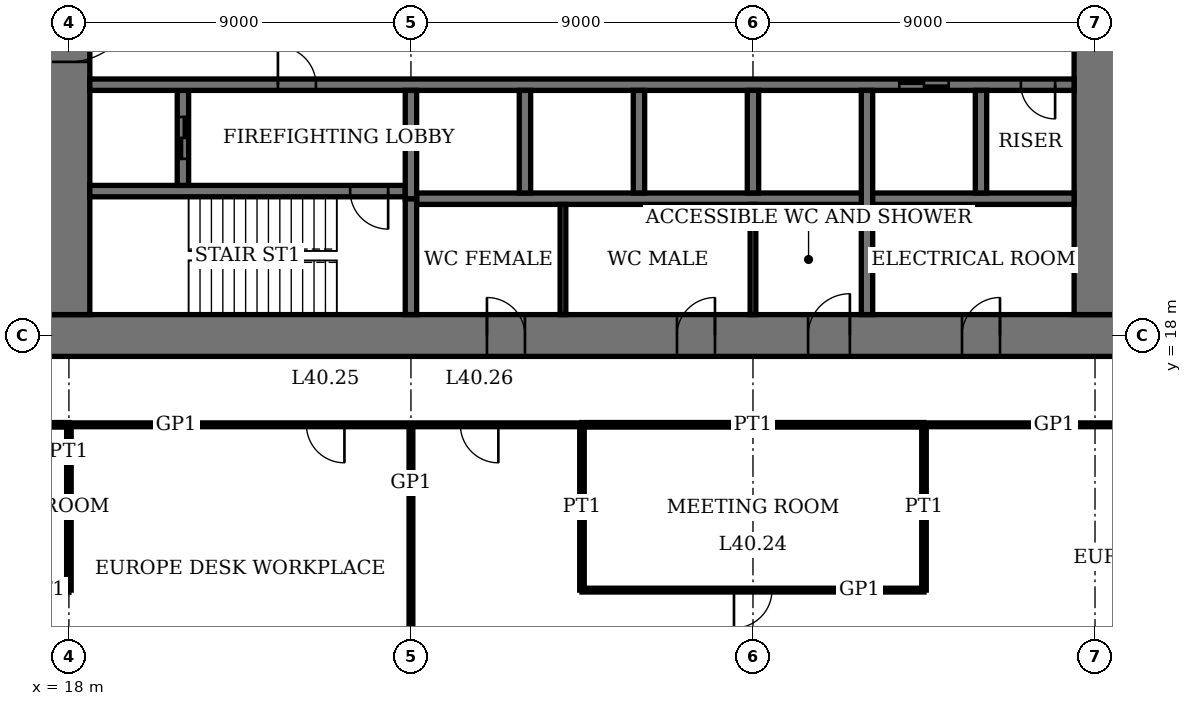
"""IFC4 building model, lengths in metres.
Left out: names, types, materials, properties, quantities, classifications, styles, units other than length and angle.
Written with IfcOpenShell. Run it as: python <this file> out.ifc"""

import sys

from ifc_helpers import new_model, si_unit, direction, frame, frame_2d, origin, place, context, subcontext, project, spatial, rectangle, extrude, element, fill, save


model = new_model("IFC4")
c1 = context("Model", 3, precision=1e-05, world=origin(), true_north=direction((0.0, 1.0)))
c2 = subcontext(c1, "Body", "Model", "MODEL_VIEW")
j1 = project(units=[si_unit("LENGTHUNIT", "METRE"), si_unit("PLANEANGLEUNIT", "RADIAN")], contexts=[c1])
p1 = place(None, origin())
s1 = spatial("IfcSite", under=j1, at=p1, CompositionType="ELEMENT")
p2 = place(p1, origin())
s2 = spatial("IfcBuilding", under=s1, at=p2, CompositionType="ELEMENT")
p3 = place(p2, frame((0.0, 0.0, 166.2)))
s3 = spatial("IfcBuildingStorey", under=s2, at=p3, CompositionType="ELEMENT", Elevation=166.2)
p4 = place(p3, frame((17.45, 18.0, 0.0), z_axis=(0.0, 0.0, 1.0), x_axis=(1.0, 0.0, 0.0)))
e1 = element("IfcWall", 1, at=p4, inside=s3, PredefinedType="SHEAR", context=c2, shape_type="SweptSolid", body=[
    extrude(rectangle(XDim=28.1, YDim=1.1, at=frame_2d((14.05, 0.0))), origin(), (0.0, 0.0, 1.0), 4.0),
])
p5 = place(p4, frame((11.55, 0.0, 0.0)))
e2 = element("IfcOpeningElement", 2, at=p5, cuts=e1, PredefinedType="OPENING", context=c2, shape_type="SweptSolid", body=[
    extrude(rectangle(XDim=1.0, YDim=2.4, at=frame_2d((0.5, 1.2))), frame((0.0, 0.56, 0.0), z_axis=(0.0, -1.0, 0.0), x_axis=(1.0, 0.0, 0.0)), (0.0, 0.0, 1.0), 1.12),
])
p6 = place(p4, frame((16.55, 0.0, 0.0)))
e3 = element("IfcOpeningElement", 3, at=p6, cuts=e1, PredefinedType="OPENING", context=c2, shape_type="SweptSolid", body=[
    extrude(rectangle(XDim=1.0, YDim=2.4, at=frame_2d((0.5, 1.2))), frame((0.0, 0.56, 0.0), z_axis=(0.0, -1.0, 0.0), x_axis=(1.0, 0.0, 0.0)), (0.0, 0.0, 1.0), 1.12),
])
p7 = place(p4, frame((20.0, 0.0, 0.0)))
e4 = element("IfcOpeningElement", 4, at=p7, cuts=e1, PredefinedType="OPENING", context=c2, shape_type="SweptSolid", body=[
    extrude(rectangle(XDim=1.1, YDim=2.4, at=frame_2d((0.55, 1.2))), frame((0.0, 0.56, 0.0), z_axis=(0.0, -1.0, 0.0), x_axis=(1.0, 0.0, 0.0)), (0.0, 0.0, 1.0), 1.12),
])
p8 = place(p4, frame((24.05, 0.0, 0.0)))
e5 = element("IfcOpeningElement", 5, at=p8, cuts=e1, PredefinedType="OPENING", context=c2, shape_type="SweptSolid", body=[
    extrude(rectangle(XDim=1.0, YDim=2.4, at=frame_2d((0.5, 1.2))), frame((0.0, 0.56, 0.0), z_axis=(0.0, -1.0, 0.0), x_axis=(1.0, 0.0, 0.0)), (0.0, 0.0, 1.0), 1.12),
])
p9 = place(p3, frame((18.0, 35.45, 0.0), z_axis=(0.0, 0.0, 1.0), x_axis=(0.0, -1.0, 0.0)))
e6 = element("IfcWall", 6, at=p9, inside=s3, PredefinedType="SHEAR", context=c2, shape_type="SweptSolid", body=[
    extrude(rectangle(XDim=16.9, YDim=1.1, at=frame_2d((8.45, 0.0))), origin(), (0.0, 0.0, 1.0), 4.0),
])
p10 = place(p9, frame((8.45, 0.0, 0.0)))
e7 = element("IfcOpeningElement", 7, at=p10, cuts=e6, PredefinedType="OPENING", context=c2, shape_type="SweptSolid", body=[
    extrude(rectangle(XDim=1.8, YDim=2.4, at=frame_2d((0.9, 1.2))), frame((0.0, 0.56, 0.0), z_axis=(0.0, -1.0, 0.0), x_axis=(1.0, 0.0, 0.0)), (0.0, 0.0, 1.0), 1.12),
])
p11 = place(p3, frame((45.0, 18.55, 0.0), z_axis=(0.0, 0.0, 1.0), x_axis=(0.0, 1.0, 0.0)))
e8 = element("IfcWall", 8, at=p11, inside=s3, PredefinedType="SHEAR", context=c2, shape_type="SweptSolid", body=[
    extrude(rectangle(XDim=16.9, YDim=1.1, at=frame_2d((8.45, 0.0))), origin(), (0.0, 0.0, 1.0), 4.0),
])
p12 = place(p11, frame((8.45, 0.0, 0.0)))
e9 = element("IfcOpeningElement", 9, at=p12, cuts=e8, PredefinedType="OPENING", context=c2, shape_type="SweptSolid", body=[
    extrude(rectangle(XDim=1.8, YDim=2.4, at=frame_2d((0.9, 1.2))), frame((0.0, 0.56, 0.0), z_axis=(0.0, -1.0, 0.0), x_axis=(1.0, 0.0, 0.0)), (0.0, 0.0, 1.0), 1.12),
])
p13 = place(p3, frame((18.55, 21.8, 0.0), z_axis=(0.0, 0.0, 1.0), x_axis=(1.0, 0.0, 0.0)))
e10 = element("IfcWall", 10, at=p13, inside=s3, PredefinedType="SHEAR", context=c2, shape_type="SweptSolid", body=[
    extrude(rectangle(XDim=8.3, YDim=0.3, at=frame_2d((4.15, 0.0))), origin(), (0.0, 0.0, 1.0), 4.0),
])
p14 = place(p13, frame((6.85, 0.0, 0.0)))
e11 = element("IfcOpeningElement", 11, at=p14, cuts=e10, PredefinedType="OPENING", context=c2, shape_type="SweptSolid", body=[
    extrude(rectangle(XDim=1.0, YDim=2.4, at=frame_2d((0.5, 1.2))), frame((0.0, 0.16, 0.0), z_axis=(0.0, -1.0, 0.0), x_axis=(1.0, 0.0, 0.0)), (0.0, 0.0, 1.0), 0.32),
])
p15 = place(p3, frame((27.0, 18.55, 0.0), z_axis=(0.0, 0.0, 1.0), x_axis=(0.0, 1.0, 0.0)))
e12 = element("IfcWall", 12, at=p15, inside=s3, PredefinedType="SHEAR", context=c2, shape_type="SweptSolid", body=[
    extrude(rectangle(XDim=3.05, YDim=0.3, at=frame_2d((1.525, 0.0))), origin(), (0.0, 0.0, 1.0), 4.0),
])
p16 = place(p3, frame((21.0, 21.95, 0.0), z_axis=(0.0, 0.0, 1.0), x_axis=(0.0, 1.0, 0.0)))
e13 = element("IfcWall", 13, at=p16, inside=s3, PredefinedType="SHEAR", context=c2, shape_type="SweptSolid", body=[
    extrude(rectangle(XDim=2.5, YDim=0.3, at=frame_2d((1.25, 0.0))), origin(), (0.0, 0.0, 1.0), 4.0),
])
p17 = place(p16, frame((0.7, 0.0, 0.0)))
e14 = element("IfcOpeningElement", 14, at=p17, cuts=e13, PredefinedType="OPENING", context=c2, shape_type="SweptSolid", body=[
    extrude(rectangle(XDim=1.1, YDim=2.4, at=frame_2d((0.55, 1.2))), frame((0.0, 0.16, 0.0), z_axis=(0.0, -1.0, 0.0), x_axis=(1.0, 0.0, 0.0)), (0.0, 0.0, 1.0), 0.32),
])
p18 = place(p3, frame((18.55, 24.6, 0.0), z_axis=(0.0, 0.0, 1.0), x_axis=(1.0, 0.0, 0.0)))
e15 = element("IfcWall", 15, at=p18, inside=s3, PredefinedType="SHEAR", context=c2, shape_type="SweptSolid", body=[
    extrude(rectangle(XDim=25.9, YDim=0.3, at=frame_2d((12.95, 0.0))), origin(), (0.0, 0.0, 1.0), 4.0),
])
p19 = place(p18, frame((4.95, 0.0, 0.0)))
e16 = element("IfcOpeningElement", 16, at=p19, cuts=e15, PredefinedType="OPENING", context=c2, shape_type="SweptSolid", body=[
    extrude(rectangle(XDim=1.0, YDim=2.4, at=frame_2d((0.5, 1.2))), frame((0.0, 0.16, 0.0), z_axis=(0.0, -1.0, 0.0), x_axis=(1.0, 0.0, 0.0)), (0.0, 0.0, 1.0), 0.32),
])
p20 = place(p18, frame((24.5, 0.0, 0.0)))
e17 = element("IfcOpeningElement", 17, at=p20, cuts=e15, PredefinedType="OPENING", context=c2, shape_type="SweptSolid", body=[
    extrude(rectangle(XDim=0.9, YDim=2.1, at=frame_2d((0.45, 1.05))), frame((0.0, 0.16, 0.0), z_axis=(0.0, -1.0, 0.0), x_axis=(1.0, 0.0, 0.0)), (0.0, 0.0, 1.0), 0.32),
])
p21 = place(p18, frame((21.3, 0.0, 0.0)))
e18 = element("IfcOpeningElement", 18, at=p21, cuts=e15, PredefinedType="OPENING", context=c2, shape_type="SweptSolid", body=[
    extrude(rectangle(XDim=1.3, YDim=2.4, at=frame_2d((0.65, 1.2))), frame((0.0, 0.16, 0.0), z_axis=(0.0, -1.0, 0.0), x_axis=(1.0, 0.0, 0.0)), (0.0, 0.0, 1.0), 0.32),
])
p22 = place(p3, frame((27.15, 21.6, 0.0), z_axis=(0.0, 0.0, 1.0), x_axis=(1.0, 0.0, 0.0)))
e19 = element("IfcWall", 19, at=p22, inside=s3, PredefinedType="SHEAR", context=c2, shape_type="SweptSolid", body=[
    extrude(rectangle(XDim=17.3, YDim=0.3, at=frame_2d((8.65, 0.0))), origin(), (0.0, 0.0, 1.0), 4.0),
])
for number, where, z_axis, x_axis in (
    (20, (30.0, 21.75, 0.0), (0.0, 0.0, 1.0), (0.0, 1.0, 0.0)),
    (21, (33.0, 21.75, 0.0), (0.0, 0.0, 1.0), (0.0, 1.0, 0.0)),
    (22, (36.0, 21.75, 0.0), (0.0, 0.0, 1.0), (0.0, 1.0, 0.0)),
):
    element("IfcWall", number, at=place(p3, frame(where, z_axis=z_axis, x_axis=x_axis)), inside=s3, PredefinedType="SHEAR", context=c2, shape_type="SweptSolid", body=[
        extrude(rectangle(XDim=2.7, YDim=0.3, at=frame_2d((1.35, 0.0))), origin(), (0.0, 0.0, 1.0), 4.0),
    ])
p23 = place(p3, frame((39.0, 18.55, 0.0), z_axis=(0.0, 0.0, 1.0), x_axis=(0.0, 1.0, 0.0)))
e23 = element("IfcWall", 23, at=p23, inside=s3, PredefinedType="SHEAR", context=c2, shape_type="SweptSolid", body=[
    extrude(rectangle(XDim=5.9, YDim=0.3, at=frame_2d((2.95, 0.0))), origin(), (0.0, 0.0, 1.0), 4.0),
])
p24 = place(p3, frame((42.0, 21.75, 0.0), z_axis=(0.0, 0.0, 1.0), x_axis=(0.0, 1.0, 0.0)))
e24 = element("IfcWall", 24, at=p24, inside=s3, PredefinedType="SHEAR", context=c2, shape_type="SweptSolid", body=[
    extrude(rectangle(XDim=2.7, YDim=0.3, at=frame_2d((1.35, 0.0))), origin(), (0.0, 0.0, 1.0), 4.0),
])
p25 = place(p3, frame((27.0, 21.6, 0.0), z_axis=(0.0, 0.0, 1.0), x_axis=(0.0, 1.0, 0.0)))
e25 = element("IfcWall", 25, at=p25, inside=s3, PredefinedType="SHEAR", context=c2, shape_type="SweptSolid", body=[
    extrude(rectangle(XDim=2.85, YDim=0.3, at=frame_2d((1.425, 0.0))), origin(), (0.0, 0.0, 1.0), 4.0),
])
p26 = place(p3, frame((13.5, 11.3, 0.0), z_axis=(0.0, 0.0, 1.0), x_axis=(1.0, 0.0, 0.0)))
e26 = element("IfcWall", 26, at=p26, inside=s3, PredefinedType="PARTITIONING", context=c2, shape_type="SweptSolid", body=[
    extrude(rectangle(XDim=4.5, YDim=0.12, at=frame_2d((2.25, 0.0))), origin(), (0.0, 0.0, 1.0), 3.75),
])
p27 = place(p26, frame((1.75, 0.0, 0.0)))
e27 = element("IfcOpeningElement", 27, at=p27, cuts=e26, PredefinedType="OPENING", context=c2, shape_type="SweptSolid", body=[
    extrude(rectangle(XDim=1.0, YDim=2.4, at=frame_2d((0.5, 1.2))), frame((0.0, 0.07, 0.0), z_axis=(0.0, -1.0, 0.0), x_axis=(1.0, 0.0, 0.0)), (0.0, 0.0, 1.0), 0.14),
])
p28 = place(p3, frame((31.5, 11.3, 0.0), z_axis=(0.0, 0.0, 1.0), x_axis=(1.0, 0.0, 0.0)))
e28 = element("IfcWall", 28, at=p28, inside=s3, PredefinedType="PARTITIONING", context=c2, shape_type="SweptSolid", body=[
    extrude(rectangle(XDim=9.0, YDim=0.1, at=frame_2d((4.5, 0.0))), origin(), (0.0, 0.0, 1.0), 3.75),
])
p29 = place(p28, frame((4.0, 0.0, 0.0)))
e29 = element("IfcOpeningElement", 29, at=p29, cuts=e28, PredefinedType="OPENING", context=c2, shape_type="SweptSolid", body=[
    extrude(rectangle(XDim=1.0, YDim=2.4, at=frame_2d((0.5, 1.2))), frame((0.0, 0.06, 0.0), z_axis=(0.0, -1.0, 0.0), x_axis=(1.0, 0.0, 0.0)), (0.0, 0.0, 1.0), 0.12),
])
p30 = place(p3, frame((31.5, 15.65, 0.0), z_axis=(0.0, 0.0, 1.0), x_axis=(1.0, 0.0, 0.0)))
e30 = element("IfcWall", 30, at=p30, inside=s3, PredefinedType="PARTITIONING", context=c2, shape_type="SweptSolid", body=[
    extrude(rectangle(XDim=9.0, YDim=0.12, at=frame_2d((4.5, 0.0))), origin(), (0.0, 0.0, 1.0), 3.75),
])
p31 = place(p3, frame((13.5, 15.65, 0.0), z_axis=(0.0, 0.0, 1.0), x_axis=(1.0, 0.0, 0.0)))
e31 = element("IfcWall", 31, at=p31, inside=s3, PredefinedType="PARTITIONING", context=c2, shape_type="SweptSolid", body=[
    extrude(rectangle(XDim=4.5, YDim=0.12, at=frame_2d((2.25, 0.0))), origin(), (0.0, 0.0, 1.0), 3.75),
])
p32 = place(p3, frame((18.0, 15.65, 0.0), z_axis=(0.0, 0.0, 1.0), x_axis=(1.0, 0.0, 0.0)))
e32 = element("IfcWall", 32, at=p32, inside=s3, PredefinedType="PARTITIONING", context=c2, shape_type="SweptSolid", body=[
    extrude(rectangle(XDim=13.5, YDim=0.1, at=frame_2d((6.75, 0.0))), origin(), (0.0, 0.0, 1.0), 3.75),
])
p33 = place(p32, frame((6.25, 0.0, 0.0)))
e33 = element("IfcOpeningElement", 33, at=p33, cuts=e32, PredefinedType="OPENING", context=c2, shape_type="SweptSolid", body=[
    extrude(rectangle(XDim=1.0, YDim=2.4, at=frame_2d((0.5, 1.2))), frame((0.0, 0.06, 0.0), z_axis=(0.0, -1.0, 0.0), x_axis=(1.0, 0.0, 0.0)), (0.0, 0.0, 1.0), 0.12),
])
p34 = place(p32, frame((10.3, 0.0, 0.0)))
e34 = element("IfcOpeningElement", 34, at=p34, cuts=e32, PredefinedType="OPENING", context=c2, shape_type="SweptSolid", body=[
    extrude(rectangle(XDim=1.0, YDim=2.4, at=frame_2d((0.5, 1.2))), frame((0.0, 0.06, 0.0), z_axis=(0.0, -1.0, 0.0), x_axis=(1.0, 0.0, 0.0)), (0.0, 0.0, 1.0), 0.12),
])
p35 = place(p3, frame((40.5, 15.65, 0.0), z_axis=(0.0, 0.0, 1.0), x_axis=(1.0, 0.0, 0.0)))
e35 = element("IfcWall", 35, at=p35, inside=s3, PredefinedType="PARTITIONING", context=c2, shape_type="SweptSolid", body=[
    extrude(rectangle(XDim=6.85, YDim=0.1, at=frame_2d((3.425, 0.0))), origin(), (0.0, 0.0, 1.0), 3.75),
])
p36 = place(p3, frame((18.0, 11.3, 0.0), z_axis=(0.0, 0.0, 1.0), x_axis=(0.0, 1.0, 0.0)))
e36 = element("IfcWall", 36, at=p36, inside=s3, PredefinedType="PARTITIONING", context=c2, shape_type="SweptSolid", body=[
    extrude(rectangle(XDim=4.35, YDim=0.12, at=frame_2d((2.175, 0.0))), origin(), (0.0, 0.0, 1.0), 3.05),
])
p37 = place(p3, frame((27.0, 9.9, 0.0), z_axis=(0.0, 0.0, 1.0), x_axis=(0.0, 1.0, 0.0)))
e37 = element("IfcWall", 37, at=p37, inside=s3, PredefinedType="PARTITIONING", context=c2, shape_type="SweptSolid", body=[
    extrude(rectangle(XDim=5.75, YDim=0.1, at=frame_2d((2.875, 0.0))), origin(), (0.0, 0.0, 1.0), 3.05),
])
for number, where, z_axis, x_axis in (
    (38, (31.5, 11.3, 0.0), (0.0, 0.0, 1.0), (0.0, 1.0, 0.0)),
    (39, (40.5, 11.3, 0.0), (0.0, 0.0, 1.0), (0.0, 1.0, 0.0)),
):
    element("IfcWall", number, at=place(p3, frame(where, z_axis=z_axis, x_axis=x_axis)), inside=s3, PredefinedType="PARTITIONING", context=c2, shape_type="SweptSolid", body=[
        extrude(rectangle(XDim=4.35, YDim=0.12, at=frame_2d((2.175, 0.0))), origin(), (0.0, 0.0, 1.0), 3.75),
    ])
for number, where, z_axis, x_axis in (
    (40, (31.0, 18.55, 0.0), (0.0, 0.0, 1.0), (0.0, 1.0, 0.0)),
    (41, (36.0, 18.55, 0.0), (0.0, 0.0, 1.0), (0.0, 1.0, 0.0)),
):
    element("IfcWall", number, at=place(p3, frame(where, z_axis=z_axis, x_axis=x_axis)), inside=s3, PredefinedType="PARTITIONING", context=c2, shape_type="SweptSolid", body=[
        extrude(rectangle(XDim=2.9, YDim=0.15, at=frame_2d((1.45, 0.0))), origin(), (0.0, 0.0, 1.0), 3.75),
    ])
p38 = place(p10, origin())
e42 = element("IfcDoor", 42, at=p38, inside=s3, OperationType="DOUBLE_DOOR_DOUBLE_SWING", PredefinedType="DOOR", context=c2, shape_type="SweptSolid", body=[
    extrude(rectangle(XDim=1.8, YDim=2.4, at=frame_2d((0.9, 1.2))), frame((0.0, 0.03, 0.0), z_axis=(0.0, -1.0, 0.0), x_axis=(1.0, 0.0, 0.0)), (0.0, 0.0, 1.0), 0.06),
    extrude(rectangle(XDim=0.04, YDim=2.4, at=frame_2d((0.02, 1.2))), frame((0.0, 0.55, 0.0), z_axis=(0.0, -1.0, 0.0), x_axis=(1.0, 0.0, 0.0)), (0.0, 0.0, 1.0), 1.1),
    extrude(rectangle(XDim=0.04, YDim=2.4, at=frame_2d((1.78, 1.2))), frame((0.0, 0.55, 0.0), z_axis=(0.0, -1.0, 0.0), x_axis=(1.0, 0.0, 0.0)), (0.0, 0.0, 1.0), 1.1),
    extrude(rectangle(XDim=1.8, YDim=0.04, at=frame_2d((0.9, 2.38))), frame((0.0, 0.55, 0.0), z_axis=(0.0, -1.0, 0.0), x_axis=(1.0, 0.0, 0.0)), (0.0, 0.0, 1.0), 1.1),
])
fill(e7, e42)
p39 = place(p5, origin())
e43 = element("IfcDoor", 43, at=p39, inside=s3, OperationType="SINGLE_SWING_RIGHT", PredefinedType="DOOR", context=c2, shape_type="SweptSolid", body=[
    extrude(rectangle(XDim=1.0, YDim=2.4, at=frame_2d((0.5, 1.2))), frame((0.0, 0.025, 0.0), z_axis=(0.0, -1.0, 0.0), x_axis=(1.0, 0.0, 0.0)), (0.0, 0.0, 1.0), 0.05),
    extrude(rectangle(XDim=0.04, YDim=2.4, at=frame_2d((0.02, 1.2))), frame((0.0, 0.4, 0.0), z_axis=(0.0, -1.0, 0.0), x_axis=(1.0, 0.0, 0.0)), (0.0, 0.0, 1.0), 0.8),
    extrude(rectangle(XDim=0.04, YDim=2.4, at=frame_2d((0.98, 1.2))), frame((0.0, 0.4, 0.0), z_axis=(0.0, -1.0, 0.0), x_axis=(1.0, 0.0, 0.0)), (0.0, 0.0, 1.0), 0.8),
    extrude(rectangle(XDim=1.0, YDim=0.04, at=frame_2d((0.5, 2.38))), frame((0.0, 0.4, 0.0), z_axis=(0.0, -1.0, 0.0), x_axis=(1.0, 0.0, 0.0)), (0.0, 0.0, 1.0), 0.8),
])
fill(e2, e43)
p40 = place(p6, origin())
e44 = element("IfcDoor", 44, at=p40, inside=s3, OperationType="SINGLE_SWING_LEFT", PredefinedType="DOOR", context=c2, shape_type="SweptSolid", body=[
    extrude(rectangle(XDim=1.0, YDim=2.4, at=frame_2d((0.5, 1.2))), frame((0.0, 0.025, 0.0), z_axis=(0.0, -1.0, 0.0), x_axis=(1.0, 0.0, 0.0)), (0.0, 0.0, 1.0), 0.05),
    extrude(rectangle(XDim=0.04, YDim=2.4, at=frame_2d((0.02, 1.2))), frame((0.0, 0.4, 0.0), z_axis=(0.0, -1.0, 0.0), x_axis=(1.0, 0.0, 0.0)), (0.0, 0.0, 1.0), 0.8),
    extrude(rectangle(XDim=0.04, YDim=2.4, at=frame_2d((0.98, 1.2))), frame((0.0, 0.4, 0.0), z_axis=(0.0, -1.0, 0.0), x_axis=(1.0, 0.0, 0.0)), (0.0, 0.0, 1.0), 0.8),
    extrude(rectangle(XDim=1.0, YDim=0.04, at=frame_2d((0.5, 2.38))), frame((0.0, 0.4, 0.0), z_axis=(0.0, -1.0, 0.0), x_axis=(1.0, 0.0, 0.0)), (0.0, 0.0, 1.0), 0.8),
])
fill(e3, e44)
p41 = place(p7, origin())
e45 = element("IfcDoor", 45, at=p41, inside=s3, OperationType="SINGLE_SWING_LEFT", PredefinedType="DOOR", context=c2, shape_type="SweptSolid", body=[
    extrude(rectangle(XDim=1.1, YDim=2.4, at=frame_2d((0.55, 1.2))), frame((0.0, 0.025, 0.0), z_axis=(0.0, -1.0, 0.0), x_axis=(1.0, 0.0, 0.0)), (0.0, 0.0, 1.0), 0.05),
    extrude(rectangle(XDim=0.04, YDim=2.4, at=frame_2d((0.02, 1.2))), frame((0.0, 0.44, 0.0), z_axis=(0.0, -1.0, 0.0), x_axis=(1.0, 0.0, 0.0)), (0.0, 0.0, 1.0), 0.88),
    extrude(rectangle(XDim=0.04, YDim=2.4, at=frame_2d((1.08, 1.2))), frame((0.0, 0.44, 0.0), z_axis=(0.0, -1.0, 0.0), x_axis=(1.0, 0.0, 0.0)), (0.0, 0.0, 1.0), 0.88),
    extrude(rectangle(XDim=1.1, YDim=0.04, at=frame_2d((0.55, 2.38))), frame((0.0, 0.44, 0.0), z_axis=(0.0, -1.0, 0.0), x_axis=(1.0, 0.0, 0.0)), (0.0, 0.0, 1.0), 0.88),
])
fill(e4, e45)
p42 = place(p8, origin())
e46 = element("IfcDoor", 46, at=p42, inside=s3, OperationType="SINGLE_SWING_LEFT", PredefinedType="DOOR", context=c2, shape_type="SweptSolid", body=[
    extrude(rectangle(XDim=1.0, YDim=2.4, at=frame_2d((0.5, 1.2))), frame((0.0, 0.025, 0.0), z_axis=(0.0, -1.0, 0.0), x_axis=(1.0, 0.0, 0.0)), (0.0, 0.0, 1.0), 0.05),
    extrude(rectangle(XDim=0.04, YDim=2.4, at=frame_2d((0.02, 1.2))), frame((0.0, 0.4, 0.0), z_axis=(0.0, -1.0, 0.0), x_axis=(1.0, 0.0, 0.0)), (0.0, 0.0, 1.0), 0.8),
    extrude(rectangle(XDim=0.04, YDim=2.4, at=frame_2d((0.98, 1.2))), frame((0.0, 0.4, 0.0), z_axis=(0.0, -1.0, 0.0), x_axis=(1.0, 0.0, 0.0)), (0.0, 0.0, 1.0), 0.8),
    extrude(rectangle(XDim=1.0, YDim=0.04, at=frame_2d((0.5, 2.38))), frame((0.0, 0.4, 0.0), z_axis=(0.0, -1.0, 0.0), x_axis=(1.0, 0.0, 0.0)), (0.0, 0.0, 1.0), 0.8),
])
fill(e5, e46)
p43 = place(p14, origin())
e47 = element("IfcDoor", 47, at=p43, inside=s3, OperationType="SINGLE_SWING_RIGHT", PredefinedType="DOOR", context=c2, shape_type="SweptSolid", body=[
    extrude(rectangle(XDim=1.0, YDim=2.4, at=frame_2d((0.5, 1.2))), frame((0.0, 0.03, 0.0), z_axis=(0.0, -1.0, 0.0), x_axis=(1.0, 0.0, 0.0)), (0.0, 0.0, 1.0), 0.06),
])
fill(e11, e47)
p44 = place(p19, origin())
e48 = element("IfcDoor", 48, at=p44, inside=s3, OperationType="SINGLE_SWING_RIGHT", PredefinedType="DOOR", context=c2, shape_type="SweptSolid", body=[
    extrude(rectangle(XDim=1.0, YDim=2.4, at=frame_2d((0.5, 1.2))), frame((0.0, 0.03, 0.0), z_axis=(0.0, -1.0, 0.0), x_axis=(1.0, 0.0, 0.0)), (0.0, 0.0, 1.0), 0.06),
])
fill(e16, e48)
p45 = place(p20, origin())
e49 = element("IfcDoor", 49, at=p45, inside=s3, OperationType="SINGLE_SWING_RIGHT", PredefinedType="DOOR", context=c2, shape_type="SweptSolid", body=[
    extrude(rectangle(XDim=0.9, YDim=2.1, at=frame_2d((0.45, 1.05))), frame((0.0, 0.03, 0.0), z_axis=(0.0, -1.0, 0.0), x_axis=(1.0, 0.0, 0.0)), (0.0, 0.0, 1.0), 0.06),
])
fill(e17, e49)
p46 = place(p29, origin())
e50 = element("IfcDoor", 50, at=p46, inside=s3, OperationType="SINGLE_SWING_LEFT", PredefinedType="DOOR", context=c2, shape_type="SweptSolid", body=[
    extrude(rectangle(XDim=1.0, YDim=2.4, at=frame_2d((0.5, 1.2))), frame((0.0, 0.02, 0.0), z_axis=(0.0, -1.0, 0.0), x_axis=(1.0, 0.0, 0.0)), (0.0, 0.0, 1.0), 0.04),
])
fill(e29, e50)
p47 = place(p33, origin())
e51 = element("IfcDoor", 51, at=p47, inside=s3, OperationType="SINGLE_SWING_RIGHT", PredefinedType="DOOR", context=c2, shape_type="SweptSolid", body=[
    extrude(rectangle(XDim=1.0, YDim=2.4, at=frame_2d((0.5, 1.2))), frame((0.0, 0.02, 0.0), z_axis=(0.0, -1.0, 0.0), x_axis=(1.0, 0.0, 0.0)), (0.0, 0.0, 1.0), 0.04),
])
fill(e33, e51)
p48 = place(p34, origin())
e52 = element("IfcDoor", 52, at=p48, inside=s3, OperationType="SINGLE_SWING_RIGHT", PredefinedType="DOOR", context=c2, shape_type="SweptSolid", body=[
    extrude(rectangle(XDim=1.0, YDim=2.4, at=frame_2d((0.5, 1.2))), frame((0.0, 0.02, 0.0), z_axis=(0.0, -1.0, 0.0), x_axis=(1.0, 0.0, 0.0)), (0.0, 0.0, 1.0), 0.04),
])
fill(e34, e52)
p49 = place(p21, origin())
e53 = element("IfcDoor", 53, at=p49, inside=s3, OperationType="DOUBLE_DOOR_SLIDING", PredefinedType="DOOR", context=c2, shape_type="SweptSolid", body=[
    extrude(rectangle(XDim=1.3, YDim=2.4, at=frame_2d((0.65, 1.2))), frame((0.0, 0.02, 0.0), z_axis=(0.0, -1.0, 0.0), x_axis=(1.0, 0.0, 0.0)), (0.0, 0.0, 1.0), 0.04),
])
fill(e18, e53)
p50 = place(p17, origin())
e54 = element("IfcDoor", 54, at=p50, inside=s3, OperationType="DOUBLE_DOOR_SLIDING", PredefinedType="DOOR", context=c2, shape_type="SweptSolid", body=[
    extrude(rectangle(XDim=1.1, YDim=2.4, at=frame_2d((0.55, 1.2))), frame((0.0, 0.03, 0.0), z_axis=(0.0, -1.0, 0.0), x_axis=(1.0, 0.0, 0.0)), (0.0, 0.0, 1.0), 0.06),
])
fill(e14, e54)
save(model, sys.argv[1])
